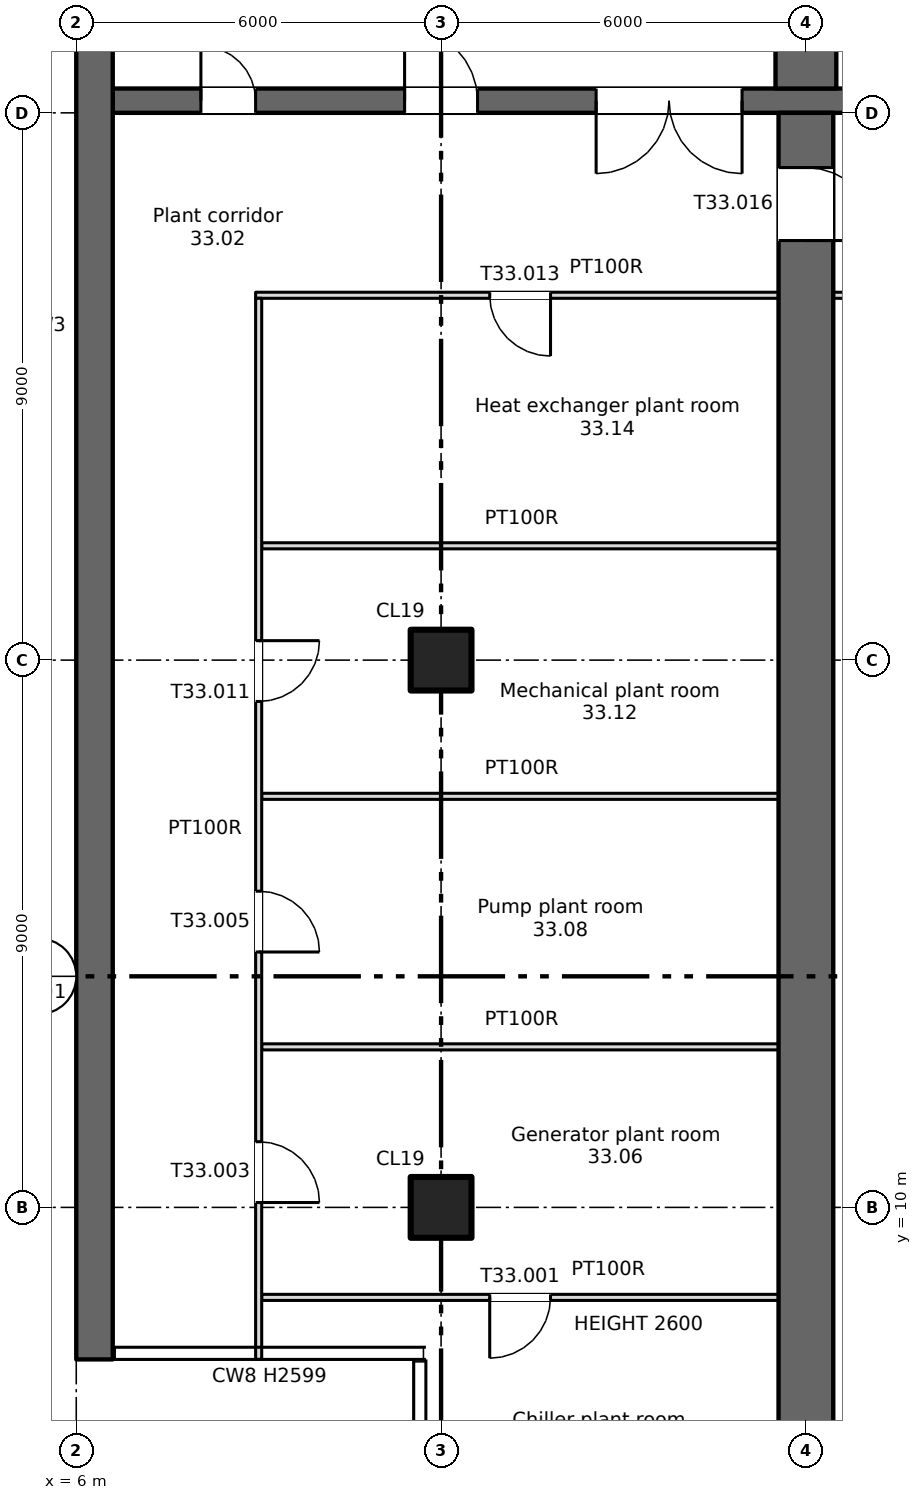
"""IFC4 building model, lengths in metres.
Left out: names, types, materials, properties, quantities, classifications, styles, units other than length and angle.
Written with IfcOpenShell. Run it as: python <this file> out.ifc"""

import sys

from ifc_helpers import new_model, si_unit, direction, frame, frame_2d, origin, origin_2d, place, context, subcontext, project, spatial, rectangle, extrude, element, fill, save


model = new_model("IFC4")
c1 = context("Model", 3, precision=1e-05, world=origin(), true_north=direction((0.0, 1.0)))
c2 = subcontext(c1, "Body", "Model", "MODEL_VIEW")
j1 = project(units=[si_unit("LENGTHUNIT", "METRE"), si_unit("PLANEANGLEUNIT", "RADIAN")], contexts=[c1])
p1 = place(None, origin())
s1 = spatial("IfcSite", under=j1, at=p1, CompositionType="ELEMENT")
p2 = place(p1, origin())
s2 = spatial("IfcBuilding", under=s1, at=p2, CompositionType="ELEMENT")
p3 = place(p2, frame((0.0, 0.0, 226.75)))
s3 = spatial("IfcBuildingStorey", under=s2, at=p3, CompositionType="ELEMENT", Elevation=226.75)
for number, where, z_axis, x_axis in (
    (1, (12.0, 10.0, 0.0), (0.0, 0.0, 1.0), (1.0, 0.0, 0.0)),
    (2, (12.0, 19.0, 0.0), (0.0, 0.0, 1.0), (1.0, 0.0, 0.0)),
):
    element("IfcColumn", number, at=place(p3, frame(where, z_axis=z_axis, x_axis=x_axis)), inside=s3, PredefinedType="COLUMN", context=c2, shape_type="SweptSolid", body=[
        extrude(rectangle(XDim=1.0, YDim=1.0, at=origin_2d()), origin(), (0.0, 0.0, 1.0), 4.2),
    ])
p4 = place(p3, frame((6.3, 7.5, 0.0), z_axis=(0.0, 0.0, 1.0), x_axis=(0.0, 1.0, 0.0)))
e3 = element("IfcWall", 3, at=p4, inside=s3, PredefinedType="SHEAR", context=c2, shape_type="SweptSolid", body=[
    extrude(rectangle(XDim=34.0, YDim=0.6, at=frame_2d((17.0, 0.0))), origin(), (0.0, 0.0, 1.0), 4.2),
])
p5 = place(p3, frame((18.0, 4.4, 0.0), z_axis=(0.0, 0.0, 1.0), x_axis=(0.0, 1.0, 0.0)))
e4 = element("IfcWall", 4, at=p5, inside=s3, PredefinedType="SHEAR", context=c2, shape_type="SweptSolid", body=[
    extrude(rectangle(XDim=23.6, YDim=0.9, at=frame_2d((11.8, 0.0))), origin(), (0.0, 0.0, 1.0), 4.2),
])
p6 = place(p5, frame((21.5, 0.0, 0.0)))
e5 = element("IfcOpeningElement", 5, at=p6, cuts=e4, PredefinedType="OPENING", context=c2, shape_type="SweptSolid", body=[
    extrude(rectangle(XDim=1.2, YDim=2.1, at=frame_2d((0.6, 1.05))), frame((0.0, 0.46, 0.0), z_axis=(0.0, -1.0, 0.0), x_axis=(1.0, 0.0, 0.0)), (0.0, 0.0, 1.0), 0.92),
])
p7 = place(p3, frame((6.6, 28.2, 0.0), z_axis=(0.0, 0.0, 1.0), x_axis=(1.0, 0.0, 0.0)))
e6 = element("IfcWall", 6, at=p7, inside=s3, PredefinedType="SHEAR", context=c2, shape_type="SweptSolid", body=[
    extrude(rectangle(XDim=57.9, YDim=0.4, at=frame_2d((28.95, 0.0))), origin(), (0.0, 0.0, 1.0), 4.2),
])
p8 = place(p7, frame((13.95, 0.0, 0.0)))
e7 = element("IfcOpeningElement", 7, at=p8, cuts=e6, PredefinedType="OPENING", context=c2, shape_type="SweptSolid", body=[
    extrude(rectangle(XDim=0.9, YDim=2.1, at=frame_2d((0.45, 1.05))), frame((0.0, 0.21, 0.0), z_axis=(0.0, -1.0, 0.0), x_axis=(1.0, 0.0, 0.0)), (0.0, 0.0, 1.0), 0.42),
])
p9 = place(p7, frame((49.95, 0.0, 0.0)))
e8 = element("IfcOpeningElement", 8, at=p9, cuts=e6, PredefinedType="OPENING", context=c2, shape_type="SweptSolid", body=[
    extrude(rectangle(XDim=0.9, YDim=2.1, at=frame_2d((0.45, 1.05))), frame((0.0, 0.21, 0.0), z_axis=(0.0, -1.0, 0.0), x_axis=(1.0, 0.0, 0.0)), (0.0, 0.0, 1.0), 0.42),
])
p10 = place(p7, frame((1.45, 0.0, 0.0)))
e9 = element("IfcOpeningElement", 9, at=p10, cuts=e6, PredefinedType="OPENING", context=c2, shape_type="SweptSolid", body=[
    extrude(rectangle(XDim=0.9, YDim=2.1, at=frame_2d((0.45, 1.05))), frame((0.0, 0.21, 0.0), z_axis=(0.0, -1.0, 0.0), x_axis=(1.0, 0.0, 0.0)), (0.0, 0.0, 1.0), 0.42),
])
p11 = place(p7, frame((4.8, 0.0, 0.0)))
e10 = element("IfcOpeningElement", 10, at=p11, cuts=e6, PredefinedType="OPENING", context=c2, shape_type="SweptSolid", body=[
    extrude(rectangle(XDim=1.2, YDim=2.1, at=frame_2d((0.6, 1.05))), frame((0.0, 0.21, 0.0), z_axis=(0.0, -1.0, 0.0), x_axis=(1.0, 0.0, 0.0)), (0.0, 0.0, 1.0), 0.42),
])
p12 = place(p7, frame((31.8, 0.0, 0.0)))
e11 = element("IfcOpeningElement", 11, at=p12, cuts=e6, PredefinedType="OPENING", context=c2, shape_type="SweptSolid", body=[
    extrude(rectangle(XDim=1.2, YDim=2.1, at=frame_2d((0.6, 1.05))), frame((0.0, 0.21, 0.0), z_axis=(0.0, -1.0, 0.0), x_axis=(1.0, 0.0, 0.0)), (0.0, 0.0, 1.0), 0.42),
])
p13 = place(p7, frame((55.3, 0.0, 0.0)))
e12 = element("IfcOpeningElement", 12, at=p13, cuts=e6, PredefinedType="OPENING", context=c2, shape_type="SweptSolid", body=[
    extrude(rectangle(XDim=1.2, YDim=2.1, at=frame_2d((0.6, 1.05))), frame((0.0, 0.21, 0.0), z_axis=(0.0, -1.0, 0.0), x_axis=(1.0, 0.0, 0.0)), (0.0, 0.0, 1.0), 0.42),
])
p14 = place(p7, frame((21.8, 0.0, 0.0)))
e13 = element("IfcOpeningElement", 13, at=p14, cuts=e6, PredefinedType="OPENING", context=c2, shape_type="SweptSolid", body=[
    extrude(rectangle(XDim=1.2, YDim=2.1, at=frame_2d((0.6, 1.05))), frame((0.0, 0.21, 0.0), z_axis=(0.0, -1.0, 0.0), x_axis=(1.0, 0.0, 0.0)), (0.0, 0.0, 1.0), 0.42),
])
p15 = place(p7, frame((41.8, 0.0, 0.0)))
e14 = element("IfcOpeningElement", 14, at=p15, cuts=e6, PredefinedType="OPENING", context=c2, shape_type="SweptSolid", body=[
    extrude(rectangle(XDim=1.2, YDim=2.1, at=frame_2d((0.6, 1.05))), frame((0.0, 0.21, 0.0), z_axis=(0.0, -1.0, 0.0), x_axis=(1.0, 0.0, 0.0)), (0.0, 0.0, 1.0), 0.42),
])
p16 = place(p7, frame((24.95, 0.0, 0.0)))
e15 = element("IfcOpeningElement", 15, at=p16, cuts=e6, PredefinedType="OPENING", context=c2, shape_type="SweptSolid", body=[
    extrude(rectangle(XDim=2.4, YDim=2.1, at=frame_2d((1.2, 1.05))), frame((0.0, 0.21, 0.0), z_axis=(0.0, -1.0, 0.0), x_axis=(1.0, 0.0, 0.0)), (0.0, 0.0, 1.0), 0.42),
])
p17 = place(p7, frame((37.45, 0.0, 0.0)))
e16 = element("IfcOpeningElement", 16, at=p17, cuts=e6, PredefinedType="OPENING", context=c2, shape_type="SweptSolid", body=[
    extrude(rectangle(XDim=2.4, YDim=2.1, at=frame_2d((1.2, 1.05))), frame((0.0, 0.21, 0.0), z_axis=(0.0, -1.0, 0.0), x_axis=(1.0, 0.0, 0.0)), (0.0, 0.0, 1.0), 0.42),
])
p18 = place(p7, frame((7.95, 0.0, 0.0)))
e17 = element("IfcOpeningElement", 17, at=p18, cuts=e6, PredefinedType="OPENING", context=c2, shape_type="SweptSolid", body=[
    extrude(rectangle(XDim=2.4, YDim=2.1, at=frame_2d((1.2, 1.05))), frame((0.0, 0.21, 0.0), z_axis=(0.0, -1.0, 0.0), x_axis=(1.0, 0.0, 0.0)), (0.0, 0.0, 1.0), 0.42),
])
p19 = place(p7, frame((28.95, 0.0, 0.0)))
e18 = element("IfcOpeningElement", 18, at=p19, cuts=e6, PredefinedType="OPENING", context=c2, shape_type="SweptSolid", body=[
    extrude(rectangle(XDim=0.9, YDim=2.1, at=frame_2d((0.45, 1.05))), frame((0.0, 0.21, 0.0), z_axis=(0.0, -1.0, 0.0), x_axis=(1.0, 0.0, 0.0)), (0.0, 0.0, 1.0), 0.42),
])
p20 = place(p7, frame((34.95, 0.0, 0.0)))
e19 = element("IfcOpeningElement", 19, at=p20, cuts=e6, PredefinedType="OPENING", context=c2, shape_type="SweptSolid", body=[
    extrude(rectangle(XDim=0.9, YDim=2.1, at=frame_2d((0.45, 1.05))), frame((0.0, 0.21, 0.0), z_axis=(0.0, -1.0, 0.0), x_axis=(1.0, 0.0, 0.0)), (0.0, 0.0, 1.0), 0.42),
])
p21 = place(p3, frame((6.8, 28.4, 0.0), z_axis=(0.0, 0.0, 1.0), x_axis=(0.0, 1.0, 0.0)))
e20 = element("IfcWall", 20, at=p21, inside=s3, PredefinedType="SHEAR", context=c2, shape_type="SweptSolid", body=[
    extrude(rectangle(XDim=12.85, YDim=0.4, at=frame_2d((6.425, 0.0))), origin(), (0.0, 0.0, 1.0), 4.2),
])
p22 = place(p3, frame((18.0, 28.4, 0.0), z_axis=(0.0, 0.0, 1.0), x_axis=(0.0, 1.0, 0.0)))
e21 = element("IfcWall", 21, at=p22, inside=s3, PredefinedType="SHEAR", context=c2, shape_type="SweptSolid", body=[
    extrude(rectangle(XDim=16.9, YDim=1.0, at=frame_2d((8.45, 0.0))), origin(), (0.0, 0.0, 1.0), 4.2),
])
p23 = place(p22, frame((9.6, 0.0, 0.0)))
e22 = element("IfcOpeningElement", 22, at=p23, cuts=e21, PredefinedType="OPENING", context=c2, shape_type="SweptSolid", body=[
    extrude(rectangle(XDim=2.0, YDim=2.1, at=frame_2d((1.0, 1.05))), frame((0.0, 0.51, 0.0), z_axis=(0.0, -1.0, 0.0), x_axis=(1.0, 0.0, 0.0)), (0.0, 0.0, 1.0), 1.02),
])
p24 = place(p22, frame((15.4, 0.0, 0.0)))
e23 = element("IfcOpeningElement", 23, at=p24, cuts=e21, PredefinedType="OPENING", context=c2, shape_type="SweptSolid", body=[
    extrude(rectangle(XDim=1.2, YDim=2.1, at=frame_2d((0.6, 1.05))), frame((0.0, 0.51, 0.0), z_axis=(0.0, -1.0, 0.0), x_axis=(1.0, 0.0, 0.0)), (0.0, 0.0, 1.0), 1.02),
])
for number, where, z_axis, x_axis in (
    (24, (10.15, 28.4, 0.0), (0.0, 0.0, 1.0), (0.0, 1.0, 0.0)),
    (25, (13.85, 28.4, 0.0), (0.0, 0.0, 1.0), (0.0, 1.0, 0.0)),
):
    element("IfcWall", number, at=place(p3, frame(where, z_axis=z_axis, x_axis=x_axis)), inside=s3, PredefinedType="SHEAR", context=c2, shape_type="SweptSolid", body=[
        extrude(rectangle(XDim=6.1, YDim=0.3, at=frame_2d((3.05, 0.0))), origin(), (0.0, 0.0, 1.0), 4.2),
    ])
p25 = place(p3, frame((9.05, 8.52, 0.0), z_axis=(0.0, 0.0, 1.0), x_axis=(1.0, 0.0, 0.0)))
e26 = element("IfcWall", 26, at=p25, inside=s3, PredefinedType="PARTITIONING", context=c2, shape_type="SweptSolid", body=[
    extrude(rectangle(XDim=8.55, YDim=0.1, at=frame_2d((4.275, 0.0))), origin(), (0.0, 0.0, 1.0), 2.6),
])
p26 = place(p25, frame((3.75, 0.0, 0.0)))
e27 = element("IfcOpeningElement", 27, at=p26, cuts=e26, PredefinedType="OPENING", context=c2, shape_type="SweptSolid", body=[
    extrude(rectangle(XDim=1.0, YDim=2.1, at=frame_2d((0.5, 1.05))), frame((0.0, 0.06, 0.0), z_axis=(0.0, -1.0, 0.0), x_axis=(1.0, 0.0, 0.0)), (0.0, 0.0, 1.0), 0.12),
])
for number, where, z_axis, x_axis in (
    (28, (9.05, 12.64, 0.0), (0.0, 0.0, 1.0), (1.0, 0.0, 0.0)),
    (29, (9.05, 16.76, 0.0), (0.0, 0.0, 1.0), (1.0, 0.0, 0.0)),
    (30, (9.05, 20.88, 0.0), (0.0, 0.0, 1.0), (1.0, 0.0, 0.0)),
):
    element("IfcWall", number, at=place(p3, frame(where, z_axis=z_axis, x_axis=x_axis)), inside=s3, PredefinedType="PARTITIONING", context=c2, shape_type="SweptSolid", body=[
        extrude(rectangle(XDim=8.55, YDim=0.1, at=frame_2d((4.275, 0.0))), origin(), (0.0, 0.0, 1.0), 4.2),
    ])
p27 = place(p3, frame((8.95, 25.0, 0.0), z_axis=(0.0, 0.0, 1.0), x_axis=(1.0, 0.0, 0.0)))
e31 = element("IfcWall", 31, at=p27, inside=s3, PredefinedType="PARTITIONING", context=c2, shape_type="SweptSolid", body=[
    extrude(rectangle(XDim=8.65, YDim=0.1, at=frame_2d((4.325, 0.0))), origin(), (0.0, 0.0, 1.0), 4.2),
])
p28 = place(p27, frame((3.85, 0.0, 0.0)))
e32 = element("IfcOpeningElement", 32, at=p28, cuts=e31, PredefinedType="OPENING", context=c2, shape_type="SweptSolid", body=[
    extrude(rectangle(XDim=1.0, YDim=2.1, at=frame_2d((0.5, 1.05))), frame((0.0, 0.06, 0.0), z_axis=(0.0, -1.0, 0.0), x_axis=(1.0, 0.0, 0.0)), (0.0, 0.0, 1.0), 0.12),
])
p29 = place(p3, frame((18.4, 25.0, 0.0), z_axis=(0.0, 0.0, 1.0), x_axis=(1.0, 0.0, 0.0)))
e33 = element("IfcWall", 33, at=p29, inside=s3, PredefinedType="PARTITIONING", context=c2, shape_type="SweptSolid", body=[
    extrude(rectangle(XDim=12.65, YDim=0.1, at=frame_2d((6.325, 0.0))), origin(), (0.0, 0.0, 1.0), 4.2),
])
p30 = place(p3, frame((9.0, 7.5, 0.0), z_axis=(0.0, 0.0, 1.0), x_axis=(0.0, 1.0, 0.0)))
e34 = element("IfcWall", 34, at=p30, inside=s3, PredefinedType="PARTITIONING", context=c2, shape_type="SweptSolid", body=[
    extrude(rectangle(XDim=17.45, YDim=0.1, at=frame_2d((8.725, 0.0))), origin(), (0.0, 0.0, 1.0), 4.2),
])
p31 = place(p30, frame((2.58, 0.0, 0.0)))
e35 = element("IfcOpeningElement", 35, at=p31, cuts=e34, PredefinedType="OPENING", context=c2, shape_type="SweptSolid", body=[
    extrude(rectangle(XDim=1.0, YDim=2.1, at=frame_2d((0.5, 1.05))), frame((0.0, 0.06, 0.0), z_axis=(0.0, -1.0, 0.0), x_axis=(1.0, 0.0, 0.0)), (0.0, 0.0, 1.0), 0.12),
])
p32 = place(p30, frame((6.7, 0.0, 0.0)))
e36 = element("IfcOpeningElement", 36, at=p32, cuts=e34, PredefinedType="OPENING", context=c2, shape_type="SweptSolid", body=[
    extrude(rectangle(XDim=1.0, YDim=2.1, at=frame_2d((0.5, 1.05))), frame((0.0, 0.06, 0.0), z_axis=(0.0, -1.0, 0.0), x_axis=(1.0, 0.0, 0.0)), (0.0, 0.0, 1.0), 0.12),
])
p33 = place(p30, frame((10.82, 0.0, 0.0)))
e37 = element("IfcOpeningElement", 37, at=p33, cuts=e34, PredefinedType="OPENING", context=c2, shape_type="SweptSolid", body=[
    extrude(rectangle(XDim=1.0, YDim=2.1, at=frame_2d((0.5, 1.05))), frame((0.0, 0.06, 0.0), z_axis=(0.0, -1.0, 0.0), x_axis=(1.0, 0.0, 0.0)), (0.0, 0.0, 1.0), 0.12),
])
p34 = place(p10, origin())
e38 = element("IfcDoor", 38, at=p34, inside=s3, OperationType="SINGLE_SWING_LEFT", PredefinedType="DOOR", context=c2, shape_type="SweptSolid", body=[
    extrude(rectangle(XDim=0.9, YDim=2.1, at=frame_2d((0.45, 1.05))), frame((0.0, 0.025, 0.0), z_axis=(0.0, -1.0, 0.0), x_axis=(1.0, 0.0, 0.0)), (0.0, 0.0, 1.0), 0.05),
])
fill(e9, e38)
p35 = place(p11, origin())
e39 = element("IfcDoor", 39, at=p35, inside=s3, OperationType="SINGLE_SWING_LEFT", PredefinedType="DOOR", context=c2, shape_type="SweptSolid", body=[
    extrude(rectangle(XDim=1.2, YDim=2.1, at=frame_2d((0.6, 1.05))), frame((0.0, 0.025, 0.0), z_axis=(0.0, -1.0, 0.0), x_axis=(1.0, 0.0, 0.0)), (0.0, 0.0, 1.0), 0.05),
])
fill(e10, e39)
p36 = place(p18, origin())
e40 = element("IfcDoor", 40, at=p36, inside=s3, OperationType="DOUBLE_DOOR_SINGLE_SWING", PredefinedType="DOOR", context=c2, shape_type="SweptSolid", body=[
    extrude(rectangle(XDim=2.4, YDim=2.1, at=frame_2d((1.2, 1.05))), frame((0.0, 0.025, 0.0), z_axis=(0.0, -1.0, 0.0), x_axis=(1.0, 0.0, 0.0)), (0.0, 0.0, 1.0), 0.05),
])
fill(e17, e40)
p37 = place(p26, origin())
e41 = element("IfcDoor", 41, at=p37, inside=s3, OperationType="SINGLE_SWING_LEFT", PredefinedType="DOOR", context=c2, shape_type="SweptSolid", body=[
    extrude(rectangle(XDim=1.0, YDim=2.1, at=frame_2d((0.5, 1.05))), frame((0.0, 0.025, 0.0), z_axis=(0.0, -1.0, 0.0), x_axis=(1.0, 0.0, 0.0)), (0.0, 0.0, 1.0), 0.05),
])
fill(e27, e41)
p38 = place(p31, origin())
e42 = element("IfcDoor", 42, at=p38, inside=s3, OperationType="SINGLE_SWING_LEFT", PredefinedType="DOOR", context=c2, shape_type="SweptSolid", body=[
    extrude(rectangle(XDim=1.0, YDim=2.1, at=frame_2d((0.5, 1.05))), frame((0.0, 0.025, 0.0), z_axis=(0.0, -1.0, 0.0), x_axis=(1.0, 0.0, 0.0)), (0.0, 0.0, 1.0), 0.05),
])
fill(e35, e42)
p39 = place(p32, origin())
e43 = element("IfcDoor", 43, at=p39, inside=s3, OperationType="SINGLE_SWING_LEFT", PredefinedType="DOOR", context=c2, shape_type="SweptSolid", body=[
    extrude(rectangle(XDim=1.0, YDim=2.1, at=frame_2d((0.5, 1.05))), frame((0.0, 0.025, 0.0), z_axis=(0.0, -1.0, 0.0), x_axis=(1.0, 0.0, 0.0)), (0.0, 0.0, 1.0), 0.05),
])
fill(e36, e43)
p40 = place(p33, origin())
e44 = element("IfcDoor", 44, at=p40, inside=s3, OperationType="SINGLE_SWING_RIGHT", PredefinedType="DOOR", context=c2, shape_type="SweptSolid", body=[
    extrude(rectangle(XDim=1.0, YDim=2.1, at=frame_2d((0.5, 1.05))), frame((0.0, 0.025, 0.0), z_axis=(0.0, -1.0, 0.0), x_axis=(1.0, 0.0, 0.0)), (0.0, 0.0, 1.0), 0.05),
])
fill(e37, e44)
p41 = place(p28, origin())
e45 = element("IfcDoor", 45, at=p41, inside=s3, OperationType="SINGLE_SWING_RIGHT", PredefinedType="DOOR", context=c2, shape_type="SweptSolid", body=[
    extrude(rectangle(XDim=1.0, YDim=2.1, at=frame_2d((0.5, 1.05))), frame((0.0, 0.025, 0.0), z_axis=(0.0, -1.0, 0.0), x_axis=(1.0, 0.0, 0.0)), (0.0, 0.0, 1.0), 0.05),
])
fill(e32, e45)
p42 = place(p6, origin())
e46 = element("IfcDoor", 46, at=p42, inside=s3, OperationType="SINGLE_SWING_LEFT", PredefinedType="DOOR", context=c2, shape_type="SweptSolid", body=[
    extrude(rectangle(XDim=1.2, YDim=2.1, at=frame_2d((0.6, 1.05))), frame((0.0, 0.025, 0.0), z_axis=(0.0, -1.0, 0.0), x_axis=(1.0, 0.0, 0.0)), (0.0, 0.0, 1.0), 0.05),
])
fill(e5, e46)
save(model, sys.argv[1])
